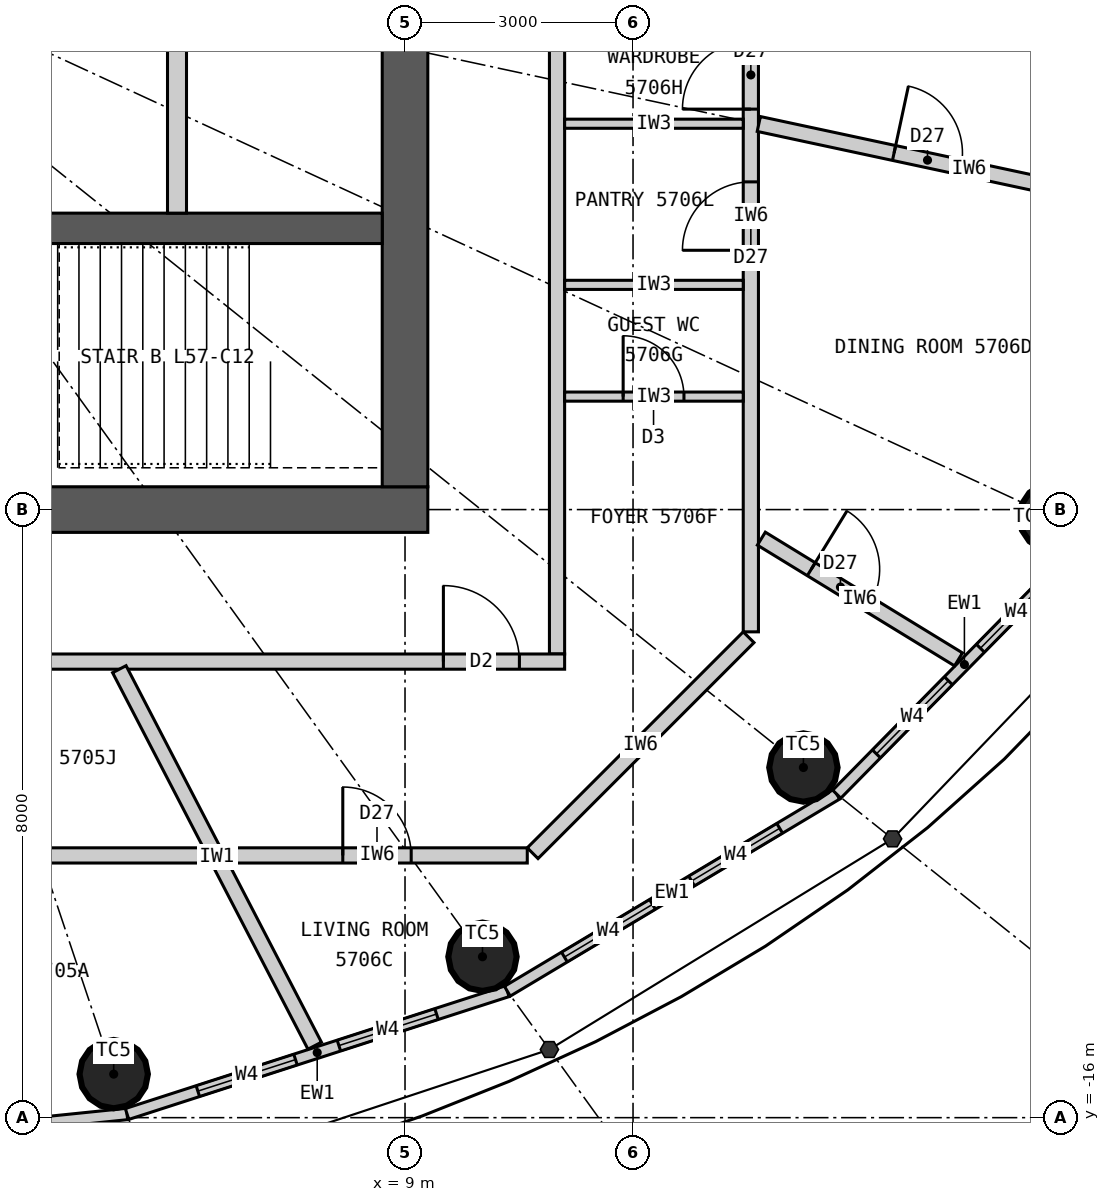
"""IFC4 building model, lengths in metres.
Left out: names, types, materials, properties, quantities, classifications, styles, units other than length and angle.
Written with IfcOpenShell. Run it as: python <this file> out.ifc"""

import sys

from ifc_helpers import new_model, si_unit, direction, frame, frame_2d, origin, origin_2d, place, context, subcontext, project, spatial, rectangle, circle, extrude, element, fill, save


model = new_model("IFC4")
c1 = context("Model", 3, precision=1e-05, world=origin(), true_north=direction((0.0, 1.0)))
c2 = subcontext(c1, "Body", "Model", "MODEL_VIEW")
j1 = project(units=[si_unit("LENGTHUNIT", "METRE"), si_unit("PLANEANGLEUNIT", "RADIAN")], contexts=[c1])
p1 = place(None, origin())
s1 = spatial("IfcSite", under=j1, at=p1, CompositionType="ELEMENT")
p2 = place(p1, origin())
s2 = spatial("IfcBuilding", under=s1, at=p2, CompositionType="ELEMENT")
p3 = place(p2, frame((0.0, 0.0, 212.7)))
s3 = spatial("IfcBuildingStorey", under=s2, at=p3, CompositionType="ELEMENT", Elevation=212.7)
for number, where, z_axis, x_axis in (
    (1, (5.167, -15.427, 0.0), (0.0, 0.0, 1.0), (1.0, 0.0, 0.0)),
    (2, (10.019, -13.883, 0.0), (0.0, 0.0, 1.0), (1.0, 0.0, 0.0)),
    (3, (14.241, -11.393, 0.0), (0.0, 0.0, 1.0), (1.0, 0.0, 0.0)),
    (4, (17.532, -8.098, 0.0), (0.0, 0.0, 1.0), (1.0, 0.0, 0.0)),
):
    element("IfcColumn", number, at=place(p3, frame(where, z_axis=z_axis, x_axis=x_axis)), inside=s3, PredefinedType="COLUMN", context=c2, shape_type="SweptSolid", body=[
        extrude(circle(Radius=0.45, at=origin_2d()), origin(), (0.0, 0.0, 1.0), 3.3),
    ])
p4 = place(p3, frame((9.3, -8.0, 0.0), z_axis=(0.0, 0.0, 1.0), x_axis=(-1.0, 0.0, 0.0)))
e5 = element("IfcWall", 5, at=p4, inside=s3, PredefinedType="SHEAR", context=c2, shape_type="SweptSolid", body=[
    extrude(rectangle(XDim=18.6, YDim=0.6, at=frame_2d((9.3, 0.0))), origin(), (0.0, 0.0, 1.0), 3.3),
])
p5 = place(p4, frame((8.0, 0.0, 0.0)))
e6 = element("IfcOpeningElement", 6, at=p5, cuts=e5, PredefinedType="OPENING", context=c2, shape_type="SweptSolid", body=[
    extrude(rectangle(XDim=1.2, YDim=2.2, at=frame_2d((0.6, 1.1))), frame((0.0, 0.31, 0.0), z_axis=(0.0, -1.0, 0.0), x_axis=(1.0, 0.0, 0.0)), (0.0, 0.0, 1.0), 0.62),
])
p6 = place(p4, frame((15.6, 0.0, 0.0)))
e7 = element("IfcOpeningElement", 7, at=p6, cuts=e5, PredefinedType="OPENING", context=c2, shape_type="SweptSolid", body=[
    extrude(rectangle(XDim=0.9, YDim=2.2, at=frame_2d((0.45, 1.1))), frame((0.0, 0.31, 0.0), z_axis=(0.0, -1.0, 0.0), x_axis=(1.0, 0.0, 0.0)), (0.0, 0.0, 1.0), 0.62),
])
p7 = place(p3, frame((9.0, -7.7, 0.0), z_axis=(0.0, 0.0, 1.0), x_axis=(0.0, 1.0, 0.0)))
e8 = element("IfcWall", 8, at=p7, inside=s3, PredefinedType="SHEAR", context=c2, shape_type="SweptSolid", body=[
    extrude(rectangle(XDim=15.4, YDim=0.6, at=frame_2d((7.7, 0.0))), origin(), (0.0, 0.0, 1.0), 3.3),
])
p8 = place(p7, frame((6.8, 0.0, 0.0)))
e9 = element("IfcOpeningElement", 9, at=p8, cuts=e8, PredefinedType="OPENING", context=c2, shape_type="SweptSolid", body=[
    extrude(rectangle(XDim=1.8, YDim=2.2, at=frame_2d((0.9, 1.1))), frame((0.0, 0.31, 0.0), z_axis=(0.0, -1.0, 0.0), x_axis=(1.0, 0.0, 0.0)), (0.0, 0.0, 1.0), 0.62),
])
p9 = place(p3, frame((-8.7, -4.3, 0.0), z_axis=(0.0, 0.0, 1.0), x_axis=(1.0, 0.0, 0.0)))
e10 = element("IfcWall", 10, at=p9, inside=s3, PredefinedType="SHEAR", context=c2, shape_type="SweptSolid", body=[
    extrude(rectangle(XDim=17.4, YDim=0.4, at=frame_2d((8.7, 0.0))), origin(), (0.0, 0.0, 1.0), 3.3),
])
p10 = place(p3, frame((6.0, -4.1, 0.0), z_axis=(0.0, 0.0, 1.0), x_axis=(0.0, 1.0, 0.0)))
e11 = element("IfcWall", 11, at=p10, inside=s3, PredefinedType="PARTITIONING", context=c2, shape_type="SweptSolid", body=[
    extrude(rectangle(XDim=2.35, YDim=0.25, at=frame_2d((1.175, 0.0))), origin(), (0.0, 0.0, 1.0), 3.3),
])
p11 = place(p3, frame((0.0, -16.5, 0.0), z_axis=(0.0, 0.0, 1.0), x_axis=(0.994774574972, 0.102095763818, 0.0)))
e12 = element("IfcWall", 12, at=p11, inside=s3, PredefinedType="ELEMENTEDWALL", context=c2, shape_type="SweptSolid", body=[
    extrude(rectangle(XDim=5.371, YDim=0.15, at=frame_2d((2.686, 0.0))), origin(), (0.0, 0.0, 1.0), 3.12),
])
p12 = place(p11, frame((1.035, 0.0, 0.9)))
e13 = element("IfcOpeningElement", 13, at=p12, cuts=e12, PredefinedType="OPENING", context=c2, shape_type="SweptSolid", body=[
    extrude(rectangle(XDim=1.35, YDim=1.9, at=frame_2d((0.675, 0.95))), frame((0.0, 0.085, 0.0), z_axis=(0.0, -1.0, 0.0), x_axis=(1.0, 0.0, 0.0)), (0.0, 0.0, 1.0), 0.17),
])
p13 = place(p11, frame((2.985, 0.0, 0.9)))
e14 = element("IfcOpeningElement", 14, at=p13, cuts=e12, PredefinedType="OPENING", context=c2, shape_type="SweptSolid", body=[
    extrude(rectangle(XDim=1.35, YDim=1.9, at=frame_2d((0.675, 0.95))), frame((0.0, 0.085, 0.0), z_axis=(0.0, -1.0, 0.0), x_axis=(1.0, 0.0, 0.0)), (0.0, 0.0, 1.0), 0.17),
])
p14 = place(p3, frame((5.343, -15.952, 0.0), z_axis=(0.0, 0.0, 1.0), x_axis=(0.951644702515, 0.307200846638, 0.0)))
e15 = element("IfcWall", 15, at=p14, inside=s3, PredefinedType="ELEMENTEDWALL", context=c2, shape_type="SweptSolid", body=[
    extrude(rectangle(XDim=5.258, YDim=0.15, at=frame_2d((2.629, 0.0))), origin(), (0.0, 0.0, 1.0), 3.12),
])
p15 = place(p14, frame((0.979, 0.0, 0.9)))
e16 = element("IfcOpeningElement", 16, at=p15, cuts=e15, PredefinedType="OPENING", context=c2, shape_type="SweptSolid", body=[
    extrude(rectangle(XDim=1.35, YDim=1.9, at=frame_2d((0.675, 0.95))), frame((0.0, 0.085, 0.0), z_axis=(0.0, -1.0, 0.0), x_axis=(1.0, 0.0, 0.0)), (0.0, 0.0, 1.0), 0.17),
])
p16 = place(p14, frame((2.929, 0.0, 0.9)))
e17 = element("IfcOpeningElement", 17, at=p16, cuts=e15, PredefinedType="OPENING", context=c2, shape_type="SweptSolid", body=[
    extrude(rectangle(XDim=1.35, YDim=1.9, at=frame_2d((0.675, 0.95))), frame((0.0, 0.085, 0.0), z_axis=(0.0, -1.0, 0.0), x_axis=(1.0, 0.0, 0.0)), (0.0, 0.0, 1.0), 0.17),
])
p17 = place(p3, frame((10.346, -14.336, 0.0), z_axis=(0.0, 0.0, 1.0), x_axis=(0.85822150553, 0.513279502265, 0.0)))
e18 = element("IfcWall", 18, at=p17, inside=s3, PredefinedType="ELEMENTEDWALL", context=c2, shape_type="SweptSolid", body=[
    extrude(rectangle(XDim=5.05, YDim=0.15, at=frame_2d((2.525, 0.0))), origin(), (0.0, 0.0, 1.0), 3.12),
])
p18 = place(p17, frame((0.875, 0.0, 0.9)))
e19 = element("IfcOpeningElement", 19, at=p18, cuts=e18, PredefinedType="OPENING", context=c2, shape_type="SweptSolid", body=[
    extrude(rectangle(XDim=1.35, YDim=1.9, at=frame_2d((0.675, 0.95))), frame((0.0, 0.085, 0.0), z_axis=(0.0, -1.0, 0.0), x_axis=(1.0, 0.0, 0.0)), (0.0, 0.0, 1.0), 0.17),
])
p19 = place(p17, frame((2.825, 0.0, 0.9)))
e20 = element("IfcOpeningElement", 20, at=p19, cuts=e18, PredefinedType="OPENING", context=c2, shape_type="SweptSolid", body=[
    extrude(rectangle(XDim=1.35, YDim=1.9, at=frame_2d((0.675, 0.95))), frame((0.0, 0.085, 0.0), z_axis=(0.0, -1.0, 0.0), x_axis=(1.0, 0.0, 0.0)), (0.0, 0.0, 1.0), 0.17),
])
p20 = place(p3, frame((14.68, -11.744, 0.0), z_axis=(0.0, 0.0, 1.0), x_axis=(0.701527379618, 0.712642501993, 0.0)))
e21 = element("IfcWall", 21, at=p20, inside=s3, PredefinedType="ELEMENTEDWALL", context=c2, shape_type="SweptSolid", body=[
    extrude(rectangle(XDim=4.788, YDim=0.15, at=frame_2d((2.394, 0.0))), origin(), (0.0, 0.0, 1.0), 3.12),
])
p21 = place(p20, frame((0.744, 0.0, 0.9)))
e22 = element("IfcOpeningElement", 22, at=p21, cuts=e21, PredefinedType="OPENING", context=c2, shape_type="SweptSolid", body=[
    extrude(rectangle(XDim=1.35, YDim=1.9, at=frame_2d((0.675, 0.95))), frame((0.0, 0.085, 0.0), z_axis=(0.0, -1.0, 0.0), x_axis=(1.0, 0.0, 0.0)), (0.0, 0.0, 1.0), 0.17),
])
p22 = place(p20, frame((2.694, 0.0, 0.9)))
e23 = element("IfcOpeningElement", 23, at=p22, cuts=e21, PredefinedType="OPENING", context=c2, shape_type="SweptSolid", body=[
    extrude(rectangle(XDim=1.35, YDim=1.9, at=frame_2d((0.675, 0.95))), frame((0.0, 0.085, 0.0), z_axis=(0.0, -1.0, 0.0), x_axis=(1.0, 0.0, 0.0)), (0.0, 0.0, 1.0), 0.17),
])
p23 = place(p3, frame((11.0, -9.9, 0.0), z_axis=(0.0, 0.0, 1.0), x_axis=(0.0, 1.0, 0.0)))
e24 = element("IfcWall", 24, at=p23, inside=s3, PredefinedType="PARTITIONING", context=c2, shape_type="SweptSolid", body=[
    extrude(rectangle(XDim=19.8, YDim=0.2, at=frame_2d((9.9, 0.0))), origin(), (0.0, 0.0, 1.0), 3.12),
])
p24 = place(p3, frame((11.1, -10.0, 0.0), z_axis=(0.0, 0.0, 1.0), x_axis=(-1.0, 0.0, 0.0)))
e25 = element("IfcWall", 25, at=p24, inside=s3, PredefinedType="PARTITIONING", context=c2, shape_type="SweptSolid", body=[
    extrude(rectangle(XDim=22.2, YDim=0.2, at=frame_2d((11.1, 0.0))), origin(), (0.0, 0.0, 1.0), 3.12),
])
p25 = place(p24, frame((11.36, 0.0, 0.0)))
e26 = element("IfcOpeningElement", 26, at=p25, cuts=e25, PredefinedType="OPENING", context=c2, shape_type="SweptSolid", body=[
    extrude(rectangle(XDim=1.0, YDim=2.2, at=frame_2d((0.5, 1.1))), frame((0.0, 0.11, 0.0), z_axis=(0.0, -1.0, 0.0), x_axis=(1.0, 0.0, 0.0)), (0.0, 0.0, 1.0), 0.22),
])
p26 = place(p24, frame((0.595, 0.0, 0.0)))
e27 = element("IfcOpeningElement", 27, at=p26, cuts=e25, PredefinedType="OPENING", context=c2, shape_type="SweptSolid", body=[
    extrude(rectangle(XDim=1.0, YDim=2.2, at=frame_2d((0.5, 1.1))), frame((0.0, 0.11, 0.0), z_axis=(0.0, -1.0, 0.0), x_axis=(1.0, 0.0, 0.0)), (0.0, 0.0, 1.0), 0.22),
])
p27 = place(p3, frame((5.241, -10.1, 0.0), z_axis=(0.0, 0.0, 1.0), x_axis=(0.460603196597, -0.887606160008, 0.0)))
e28 = element("IfcWall", 28, at=p27, inside=s3, PredefinedType="PARTITIONING", context=c2, shape_type="SweptSolid", body=[
    extrude(rectangle(XDim=5.58, YDim=0.2, at=frame_2d((2.79, 0.0))), origin(), (0.0, 0.0, 1.0), 3.12),
])
p28 = place(p3, frame((-4.082, -12.55, 0.0), z_axis=(0.0, 0.0, 1.0), x_axis=(1.0, 0.0, 0.0)))
e29 = element("IfcWall", 29, at=p28, inside=s3, PredefinedType="PARTITIONING", context=c2, shape_type="SweptSolid", body=[
    extrude(rectangle(XDim=10.446, YDim=0.2, at=frame_2d((5.223, 0.0))), origin(), (0.0, 0.0, 1.0), 3.12),
])
p29 = place(p28, frame((6.757, 0.0, 0.0)))
e30 = element("IfcOpeningElement", 30, at=p29, cuts=e29, PredefinedType="OPENING", context=c2, shape_type="SweptSolid", body=[
    extrude(rectangle(XDim=0.8, YDim=2.1, at=frame_2d((0.4, 1.05))), frame((0.0, 0.11, 0.0), z_axis=(0.0, -1.0, 0.0), x_axis=(1.0, 0.0, 0.0)), (0.0, 0.0, 1.0), 0.22),
])
p30 = place(p28, frame((3.372, 0.0, 0.0)))
e31 = element("IfcOpeningElement", 31, at=p30, cuts=e29, PredefinedType="OPENING", context=c2, shape_type="SweptSolid", body=[
    extrude(rectangle(XDim=0.9, YDim=2.1, at=frame_2d((0.45, 1.05))), frame((0.0, 0.11, 0.0), z_axis=(0.0, -1.0, 0.0), x_axis=(1.0, 0.0, 0.0)), (0.0, 0.0, 1.0), 0.22),
])
p31 = place(p3, frame((6.661, -12.55, 0.0), z_axis=(0.0, 0.0, 1.0), x_axis=(1.0, 0.0, 0.0)))
e32 = element("IfcWall", 32, at=p31, inside=s3, PredefinedType="PARTITIONING", context=c2, shape_type="SweptSolid", body=[
    extrude(rectangle(XDim=3.947, YDim=0.2, at=frame_2d((1.974, 0.0))), origin(), (0.0, 0.0, 1.0), 3.12),
])
p32 = place(p31, frame((1.52, 0.0, 0.0)))
e33 = element("IfcOpeningElement", 33, at=p32, cuts=e32, PredefinedType="OPENING", context=c2, shape_type="SweptSolid", body=[
    extrude(rectangle(XDim=0.9, YDim=2.1, at=frame_2d((0.45, 1.05))), frame((0.0, 0.11, 0.0), z_axis=(0.0, -1.0, 0.0), x_axis=(1.0, 0.0, 0.0)), (0.0, 0.0, 1.0), 0.22),
])
p33 = place(p3, frame((10.679, -12.521, 0.0), z_axis=(0.0, 0.0, 1.0), x_axis=(0.707106781187, 0.707106781187, 0.0)))
e34 = element("IfcWall", 34, at=p33, inside=s3, PredefinedType="PARTITIONING", context=c2, shape_type="SweptSolid", body=[
    extrude(rectangle(XDim=4.019, YDim=0.2, at=frame_2d((2.009, 0.0))), origin(), (0.0, 0.0, 1.0), 3.12),
])
p34 = place(p3, frame((13.55, -9.609, 0.0), z_axis=(0.0, 0.0, 1.0), x_axis=(0.0, 1.0, 0.0)))
e35 = element("IfcWall", 35, at=p34, inside=s3, PredefinedType="PARTITIONING", context=c2, shape_type="SweptSolid", body=[
    extrude(rectangle(XDim=10.93, YDim=0.2, at=frame_2d((5.465, 0.0))), origin(), (0.0, 0.0, 1.0), 3.12),
])
p35 = place(p34, frame((5.02, 0.0, 0.0)))
e36 = element("IfcOpeningElement", 36, at=p35, cuts=e35, PredefinedType="OPENING", context=c2, shape_type="SweptSolid", body=[
    extrude(rectangle(XDim=0.9, YDim=2.1, at=frame_2d((0.45, 1.05))), frame((0.0, 0.11, 0.0), z_axis=(0.0, -1.0, 0.0), x_axis=(1.0, 0.0, 0.0)), (0.0, 0.0, 1.0), 0.22),
])
p36 = place(p34, frame((6.877, 0.0, 0.0)))
e37 = element("IfcOpeningElement", 37, at=p36, cuts=e35, PredefinedType="OPENING", context=c2, shape_type="SweptSolid", body=[
    extrude(rectangle(XDim=0.9, YDim=2.1, at=frame_2d((0.45, 1.05))), frame((0.0, 0.11, 0.0), z_axis=(0.0, -1.0, 0.0), x_axis=(1.0, 0.0, 0.0)), (0.0, 0.0, 1.0), 0.22),
])
p37 = place(p34, frame((8.565, 0.0, 0.0)))
e38 = element("IfcOpeningElement", 38, at=p37, cuts=e35, PredefinedType="OPENING", context=c2, shape_type="SweptSolid", body=[
    extrude(rectangle(XDim=0.8, YDim=2.1, at=frame_2d((0.4, 1.05))), frame((0.0, 0.11, 0.0), z_axis=(0.0, -1.0, 0.0), x_axis=(1.0, 0.0, 0.0)), (0.0, 0.0, 1.0), 0.22),
])
p38 = place(p3, frame((13.688, -8.382, 0.0), z_axis=(0.0, 0.0, 1.0), x_axis=(0.852783459586, -0.522264656144, 0.0)))
e39 = element("IfcWall", 39, at=p38, inside=s3, PredefinedType="PARTITIONING", context=c2, shape_type="SweptSolid", body=[
    extrude(rectangle(XDim=3.042, YDim=0.2, at=frame_2d((1.521, 0.0))), origin(), (0.0, 0.0, 1.0), 3.12),
])
p39 = place(p38, frame((0.77, 0.0, 0.0)))
e40 = element("IfcOpeningElement", 40, at=p39, cuts=e39, PredefinedType="OPENING", context=c2, shape_type="SweptSolid", body=[
    extrude(rectangle(XDim=0.9, YDim=2.1, at=frame_2d((0.45, 1.05))), frame((0.0, 0.11, 0.0), z_axis=(0.0, -1.0, 0.0), x_axis=(1.0, 0.0, 0.0)), (0.0, 0.0, 1.0), 0.22),
])
p40 = place(p3, frame((13.655, -2.927, 0.0), z_axis=(0.0, 0.0, 1.0), x_axis=(0.977790419294, -0.209585056568, 0.0)))
e41 = element("IfcWall", 41, at=p40, inside=s3, PredefinedType="PARTITIONING", context=c2, shape_type="SweptSolid", body=[
    extrude(rectangle(XDim=5.66, YDim=0.2, at=frame_2d((2.83, 0.0))), origin(), (0.0, 0.0, 1.0), 2.42),
])
p41 = place(p40, frame((1.82, 0.0, 0.0)))
e42 = element("IfcOpeningElement", 42, at=p41, cuts=e41, PredefinedType="OPENING", context=c2, shape_type="SweptSolid", body=[
    extrude(rectangle(XDim=0.9, YDim=2.1, at=frame_2d((0.45, 1.05))), frame((0.0, 0.11, 0.0), z_axis=(0.0, -1.0, 0.0), x_axis=(1.0, 0.0, 0.0)), (0.0, 0.0, 1.0), 0.22),
])
p42 = place(p3, frame((11.1, -6.514, 0.0), z_axis=(0.0, 0.0, 1.0), x_axis=(1.0, 0.0, 0.0)))
e43 = element("IfcWall", 43, at=p42, inside=s3, PredefinedType="PARTITIONING", context=c2, shape_type="SweptSolid", body=[
    extrude(rectangle(XDim=2.35, YDim=0.12, at=frame_2d((1.175, 0.0))), origin(), (0.0, 0.0, 1.0), 3.12),
])
p43 = place(p42, frame((0.77, 0.0, 0.0)))
e44 = element("IfcOpeningElement", 44, at=p43, cuts=e43, PredefinedType="OPENING", context=c2, shape_type="SweptSolid", body=[
    extrude(rectangle(XDim=0.8, YDim=2.1, at=frame_2d((0.4, 1.05))), frame((0.0, 0.07, 0.0), z_axis=(0.0, -1.0, 0.0), x_axis=(1.0, 0.0, 0.0)), (0.0, 0.0, 1.0), 0.14),
])
p44 = place(p3, frame((11.1, -5.044, 0.0), z_axis=(0.0, 0.0, 1.0), x_axis=(1.0, 0.0, 0.0)))
e45 = element("IfcWall", 45, at=p44, inside=s3, PredefinedType="PARTITIONING", context=c2, shape_type="SweptSolid", body=[
    extrude(rectangle(XDim=2.35, YDim=0.12, at=frame_2d((1.175, 0.0))), origin(), (0.0, 0.0, 1.0), 3.12),
])
p45 = place(p3, frame((11.1, -2.924, 0.0), z_axis=(0.0, 0.0, 1.0), x_axis=(1.0, 0.0, 0.0)))
e46 = element("IfcWall", 46, at=p45, inside=s3, PredefinedType="PARTITIONING", context=c2, shape_type="SweptSolid", body=[
    extrude(rectangle(XDim=2.35, YDim=0.12, at=frame_2d((1.175, 0.0))), origin(), (0.0, 0.0, 1.0), 2.42),
])
p46 = place(p15, origin())
e47 = element("IfcWindow", 47, at=p46, inside=s3, PartitioningType="SINGLE_PANEL", PredefinedType="WINDOW", context=c2, shape_type="SweptSolid", body=[
    extrude(rectangle(XDim=1.35, YDim=1.9, at=frame_2d((0.675, 0.95))), frame((0.0, 0.03, 0.0), z_axis=(0.0, -1.0, 0.0), x_axis=(1.0, 0.0, 0.0)), (0.0, 0.0, 1.0), 0.06),
])
fill(e16, e47)
p47 = place(p16, origin())
e48 = element("IfcWindow", 48, at=p47, inside=s3, PartitioningType="SINGLE_PANEL", PredefinedType="WINDOW", context=c2, shape_type="SweptSolid", body=[
    extrude(rectangle(XDim=1.35, YDim=1.9, at=frame_2d((0.675, 0.95))), frame((0.0, 0.03, 0.0), z_axis=(0.0, -1.0, 0.0), x_axis=(1.0, 0.0, 0.0)), (0.0, 0.0, 1.0), 0.06),
])
fill(e17, e48)
p48 = place(p18, origin())
e49 = element("IfcWindow", 49, at=p48, inside=s3, PartitioningType="SINGLE_PANEL", PredefinedType="WINDOW", context=c2, shape_type="SweptSolid", body=[
    extrude(rectangle(XDim=1.35, YDim=1.9, at=frame_2d((0.675, 0.95))), frame((0.0, 0.03, 0.0), z_axis=(0.0, -1.0, 0.0), x_axis=(1.0, 0.0, 0.0)), (0.0, 0.0, 1.0), 0.06),
])
fill(e19, e49)
p49 = place(p19, origin())
e50 = element("IfcWindow", 50, at=p49, inside=s3, PartitioningType="SINGLE_PANEL", PredefinedType="WINDOW", context=c2, shape_type="SweptSolid", body=[
    extrude(rectangle(XDim=1.35, YDim=1.9, at=frame_2d((0.675, 0.95))), frame((0.0, 0.03, 0.0), z_axis=(0.0, -1.0, 0.0), x_axis=(1.0, 0.0, 0.0)), (0.0, 0.0, 1.0), 0.06),
])
fill(e20, e50)
p50 = place(p21, origin())
e51 = element("IfcWindow", 51, at=p50, inside=s3, PartitioningType="SINGLE_PANEL", PredefinedType="WINDOW", context=c2, shape_type="SweptSolid", body=[
    extrude(rectangle(XDim=1.35, YDim=1.9, at=frame_2d((0.675, 0.95))), frame((0.0, 0.03, 0.0), z_axis=(0.0, -1.0, 0.0), x_axis=(1.0, 0.0, 0.0)), (0.0, 0.0, 1.0), 0.06),
])
fill(e22, e51)
p51 = place(p22, origin())
e52 = element("IfcWindow", 52, at=p51, inside=s3, PartitioningType="SINGLE_PANEL", PredefinedType="WINDOW", context=c2, shape_type="SweptSolid", body=[
    extrude(rectangle(XDim=1.35, YDim=1.9, at=frame_2d((0.675, 0.95))), frame((0.0, 0.03, 0.0), z_axis=(0.0, -1.0, 0.0), x_axis=(1.0, 0.0, 0.0)), (0.0, 0.0, 1.0), 0.06),
])
fill(e23, e52)
p52 = place(p26, origin())
e53 = element("IfcDoor", 53, at=p52, inside=s3, OperationType="SINGLE_SWING_RIGHT", PredefinedType="DOOR", context=c2, shape_type="SweptSolid", body=[
    extrude(rectangle(XDim=1.0, YDim=2.2, at=frame_2d((0.5, 1.1))), frame((0.0, 0.025, 0.0), z_axis=(0.0, -1.0, 0.0), x_axis=(1.0, 0.0, 0.0)), (0.0, 0.0, 1.0), 0.05),
])
fill(e27, e53)
p53 = place(p43, origin())
e54 = element("IfcDoor", 54, at=p53, inside=s3, OperationType="SINGLE_SWING_LEFT", PredefinedType="DOOR", context=c2, shape_type="SweptSolid", body=[
    extrude(rectangle(XDim=0.8, YDim=2.1, at=frame_2d((0.4, 1.05))), frame((0.0, 0.025, 0.0), z_axis=(0.0, -1.0, 0.0), x_axis=(1.0, 0.0, 0.0)), (0.0, 0.0, 1.0), 0.05),
])
fill(e44, e54)
p54 = place(p35, origin())
e55 = element("IfcDoor", 55, at=p54, inside=s3, OperationType="SINGLE_SWING_LEFT", PredefinedType="DOOR", context=c2, shape_type="SweptSolid", body=[
    extrude(rectangle(XDim=0.9, YDim=2.1, at=frame_2d((0.45, 1.05))), frame((0.0, 0.025, 0.0), z_axis=(0.0, -1.0, 0.0), x_axis=(1.0, 0.0, 0.0)), (0.0, 0.0, 1.0), 0.05),
])
fill(e36, e55)
p55 = place(p36, origin())
e56 = element("IfcDoor", 56, at=p55, inside=s3, OperationType="SINGLE_SWING_LEFT", PredefinedType="DOOR", context=c2, shape_type="SweptSolid", body=[
    extrude(rectangle(XDim=0.9, YDim=2.1, at=frame_2d((0.45, 1.05))), frame((0.0, 0.025, 0.0), z_axis=(0.0, -1.0, 0.0), x_axis=(1.0, 0.0, 0.0)), (0.0, 0.0, 1.0), 0.05),
])
fill(e37, e56)
p56 = place(p32, origin())
e57 = element("IfcDoor", 57, at=p56, inside=s3, OperationType="SINGLE_SWING_LEFT", PredefinedType="DOOR", context=c2, shape_type="SweptSolid", body=[
    extrude(rectangle(XDim=0.9, YDim=2.1, at=frame_2d((0.45, 1.05))), frame((0.0, 0.025, 0.0), z_axis=(0.0, -1.0, 0.0), x_axis=(1.0, 0.0, 0.0)), (0.0, 0.0, 1.0), 0.05),
])
fill(e33, e57)
p57 = place(p39, origin())
e58 = element("IfcDoor", 58, at=p57, inside=s3, OperationType="SINGLE_SWING_LEFT", PredefinedType="DOOR", context=c2, shape_type="SweptSolid", body=[
    extrude(rectangle(XDim=0.9, YDim=2.1, at=frame_2d((0.45, 1.05))), frame((0.0, 0.025, 0.0), z_axis=(0.0, -1.0, 0.0), x_axis=(1.0, 0.0, 0.0)), (0.0, 0.0, 1.0), 0.05),
])
fill(e40, e58)
p58 = place(p41, origin())
e59 = element("IfcDoor", 59, at=p58, inside=s3, OperationType="SINGLE_SWING_LEFT", PredefinedType="DOOR", context=c2, shape_type="SweptSolid", body=[
    extrude(rectangle(XDim=0.9, YDim=2.1, at=frame_2d((0.45, 1.05))), frame((0.0, 0.025, 0.0), z_axis=(0.0, -1.0, 0.0), x_axis=(1.0, 0.0, 0.0)), (0.0, 0.0, 1.0), 0.05),
])
fill(e42, e59)
save(model, sys.argv[1])
